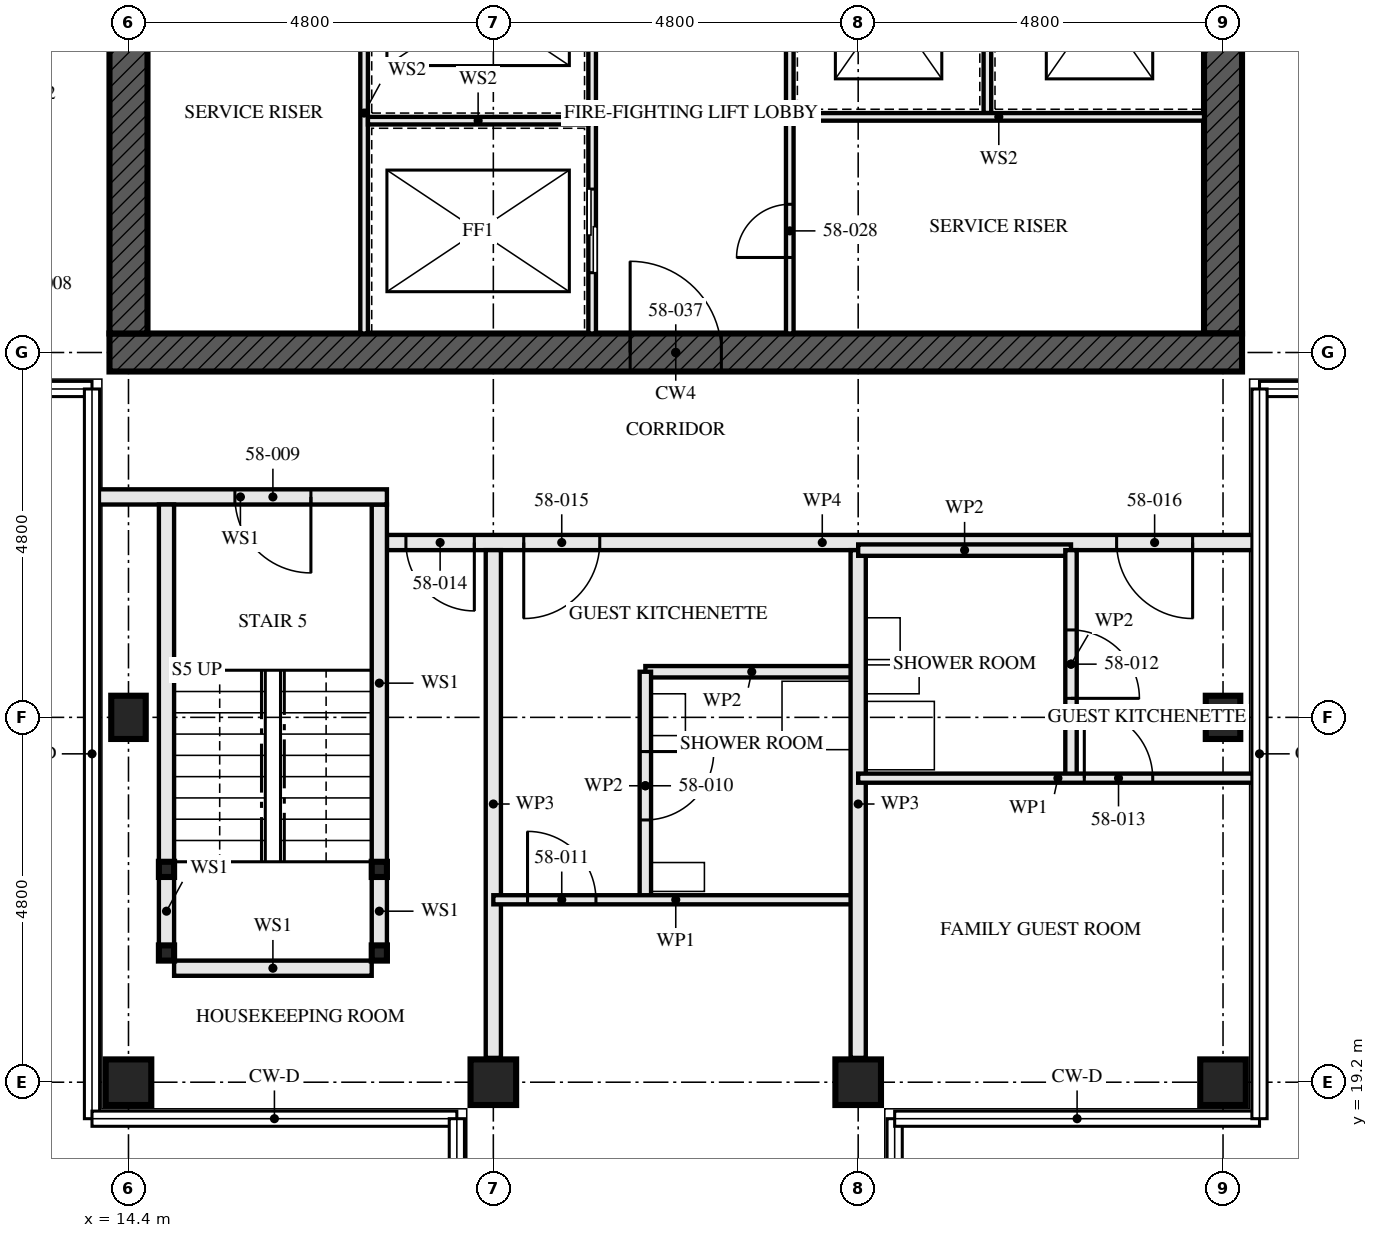
"""IFC4 building model, lengths in metres.
Left out: names, types, materials, properties, quantities, classifications, styles, units other than length and angle.
Written with IfcOpenShell. Run it as: python <this file> out.ifc"""

import sys

from ifc_helpers import new_model, si_unit, direction, frame, frame_2d, origin, origin_2d, place, context, subcontext, project, spatial, rectangle, hollow_rectangle, i_section, extrude, element, fill, save


model = new_model("IFC4")
c1 = context("Model", 3, precision=1e-05, world=origin(), true_north=direction((0.0, 1.0)))
c2 = subcontext(c1, "Body", "Model", "MODEL_VIEW")
j1 = project(units=[si_unit("LENGTHUNIT", "METRE"), si_unit("PLANEANGLEUNIT", "RADIAN")], contexts=[c1])
p1 = place(None, origin())
s1 = spatial("IfcSite", under=j1, at=p1, CompositionType="ELEMENT")
p2 = place(p1, origin())
s2 = spatial("IfcBuilding", under=s1, at=p2, CompositionType="ELEMENT")
p3 = place(p2, frame((0.0, 0.0, 212.0)))
s3 = spatial("IfcBuildingStorey", under=s2, at=p3, CompositionType="ELEMENT", Elevation=212.0)
p4 = place(p3, frame((14.4, 19.2, 0.0), z_axis=(0.0, 0.0, 1.0), x_axis=(0.0, 1.0, 0.0)))
e1 = element("IfcColumn", 1, at=p4, inside=s3, PredefinedType="COLUMN", context=c2, shape_type="SweptSolid", body=[
    extrude(hollow_rectangle(XDim=0.6, YDim=0.6, WallThickness=0.05, at=origin_2d()), origin(), (0.0, 0.0, 1.0), 3.5),
])
p5 = place(p3, frame((14.4, 24.0, 0.0), z_axis=(0.0, 0.0, 1.0), x_axis=(1.0, 0.0, 0.0)))
e2 = element("IfcColumn", 2, at=p5, inside=s3, PredefinedType="COLUMN", context=c2, shape_type="SweptSolid", body=[
    extrude(i_section(OverallWidth=0.454, OverallDepth=0.569, WebThickness=0.078, FlangeThickness=0.125, FilletRadius=0.015, at=origin_2d()), origin(), (0.0, 0.0, 1.0), 3.5),
])
for number, where, z_axis, x_axis in (
    (3, (19.2, 19.2, 0.0), (0.0, 0.0, 1.0), (0.0, 1.0, 0.0)),
    (4, (24.0, 19.2, 0.0), (0.0, 0.0, 1.0), (0.0, 1.0, 0.0)),
    (5, (28.8, 19.2, 0.0), (0.0, 0.0, 1.0), (0.0, 1.0, 0.0)),
):
    element("IfcColumn", number, at=place(p3, frame(where, z_axis=z_axis, x_axis=x_axis)), inside=s3, PredefinedType="COLUMN", context=c2, shape_type="SweptSolid", body=[
        extrude(hollow_rectangle(XDim=0.6, YDim=0.6, WallThickness=0.05, at=origin_2d()), origin(), (0.0, 0.0, 1.0), 3.5),
    ])
p6 = place(p3, frame((28.8, 24.0, 0.0), z_axis=(0.0, 0.0, 1.0), x_axis=(1.0, 0.0, 0.0)))
e6 = element("IfcColumn", 6, at=p6, inside=s3, PredefinedType="COLUMN", context=c2, shape_type="SweptSolid", body=[
    extrude(i_section(OverallWidth=0.454, OverallDepth=0.569, WebThickness=0.078, FlangeThickness=0.125, FilletRadius=0.015, at=origin_2d()), origin(), (0.0, 0.0, 1.0), 3.5),
])
p7 = place(p3, frame((14.15, 28.8, -0.17), z_axis=(0.0, 0.0, 1.0), x_axis=(1.0, 0.0, 0.0)))
e7 = element("IfcWall", 7, at=p7, inside=s3, PredefinedType="SHEAR", context=c2, shape_type="SweptSolid", body=[
    extrude(rectangle(XDim=14.9, YDim=0.5, at=frame_2d((7.45, 0.0))), origin(), (0.0, 0.0, 1.0), 3.5),
])
p8 = place(p7, frame((6.85, 0.0, 0.17)))
e8 = element("IfcOpeningElement", 8, at=p8, cuts=e7, PredefinedType="OPENING", context=c2, shape_type="SweptSolid", body=[
    extrude(rectangle(XDim=1.2, YDim=2.1, at=frame_2d((0.6, 1.05))), frame((0.0, 0.26, 0.0), z_axis=(0.0, -1.0, 0.0), x_axis=(1.0, 0.0, 0.0)), (0.0, 0.0, 1.0), 0.521),
])
p9 = place(p3, frame((14.4, 42.95, -0.17), z_axis=(0.0, 0.0, 1.0), x_axis=(0.0, -1.0, 0.0)))
e9 = element("IfcWall", 9, at=p9, inside=s3, PredefinedType="SHEAR", context=c2, shape_type="SweptSolid", body=[
    extrude(rectangle(XDim=13.9, YDim=0.5, at=frame_2d((6.95, 0.0))), origin(), (0.0, 0.0, 1.0), 3.5),
])
p10 = place(p9, frame((6.35, 0.0, 0.17)))
e10 = element("IfcOpeningElement", 10, at=p10, cuts=e9, PredefinedType="OPENING", context=c2, shape_type="SweptSolid", body=[
    extrude(rectangle(XDim=1.2, YDim=2.1, at=frame_2d((0.6, 1.05))), frame((0.0, 0.26, 0.0), z_axis=(0.0, -1.0, 0.0), x_axis=(1.0, 0.0, 0.0)), (0.0, 0.0, 1.0), 0.521),
])
p11 = place(p3, frame((28.8, 29.05, -0.17), z_axis=(0.0, 0.0, 1.0), x_axis=(0.0, 1.0, 0.0)))
e11 = element("IfcWall", 11, at=p11, inside=s3, PredefinedType="SHEAR", context=c2, shape_type="SweptSolid", body=[
    extrude(rectangle(XDim=13.9, YDim=0.5, at=frame_2d((6.95, 0.0))), origin(), (0.0, 0.0, 1.0), 3.5),
])
p12 = place(p11, frame((6.35, 0.0, 0.17)))
e12 = element("IfcOpeningElement", 12, at=p12, cuts=e11, PredefinedType="OPENING", context=c2, shape_type="SweptSolid", body=[
    extrude(rectangle(XDim=1.2, YDim=2.1, at=frame_2d((0.6, 1.05))), frame((0.0, 0.26, 0.0), z_axis=(0.0, -1.0, 0.0), x_axis=(1.0, 0.0, 0.0)), (0.0, 0.0, 1.0), 0.521),
])
for number, where, z_axis, x_axis in (
    (13, (14.9, 20.9, 0.0), (0.0, 0.0, 1.0), (1.0, 0.0, 0.0)),
    (14, (17.7, 20.9, 0.0), (0.0, 0.0, 1.0), (1.0, 0.0, 0.0)),
    (15, (14.9, 22.0, 0.0), (0.0, 0.0, 1.0), (1.0, 0.0, 0.0)),
    (16, (17.7, 22.0, 0.0), (0.0, 0.0, 1.0), (1.0, 0.0, 0.0)),
):
    element("IfcColumn", number, at=place(p3, frame(where, z_axis=z_axis, x_axis=x_axis)), inside=s3, PredefinedType="COLUMN", context=c2, shape_type="SweptSolid", body=[
        extrude(hollow_rectangle(XDim=0.2, YDim=0.2, WallThickness=0.008, at=origin_2d()), origin(), (0.0, 0.0, 1.0), 3.33),
    ])
p13 = place(p3, frame((14.9, 21.0, 0.0), z_axis=(0.0, 0.0, 1.0), x_axis=(0.0, 1.0, 0.0)))
e17 = element("IfcWall", 17, at=p13, inside=s3, PredefinedType="SOLIDWALL", context=c2, shape_type="SweptSolid", body=[
    extrude(rectangle(XDim=0.9, YDim=0.2, at=frame_2d((0.45, 0.0))), origin(), (0.0, 0.0, 1.0), 2.99),
])
p14 = place(p3, frame((14.9, 22.1, 0.0), z_axis=(0.0, 0.0, 1.0), x_axis=(0.0, 1.0, 0.0)))
e18 = element("IfcWall", 18, at=p14, inside=s3, PredefinedType="SOLIDWALL", context=c2, shape_type="SweptSolid", body=[
    extrude(rectangle(XDim=4.7, YDim=0.2, at=frame_2d((2.35, 0.0))), origin(), (0.0, 0.0, 1.0), 2.99),
])
p15 = place(p3, frame((17.7, 21.0, 0.0), z_axis=(0.0, 0.0, 1.0), x_axis=(0.0, 1.0, 0.0)))
e19 = element("IfcWall", 19, at=p15, inside=s3, PredefinedType="SOLIDWALL", context=c2, shape_type="SweptSolid", body=[
    extrude(rectangle(XDim=0.9, YDim=0.2, at=frame_2d((0.45, 0.0))), origin(), (0.0, 0.0, 1.0), 2.99),
])
p16 = place(p3, frame((17.7, 22.1, 0.0), z_axis=(0.0, 0.0, 1.0), x_axis=(0.0, 1.0, 0.0)))
e20 = element("IfcWall", 20, at=p16, inside=s3, PredefinedType="SOLIDWALL", context=c2, shape_type="SweptSolid", body=[
    extrude(rectangle(XDim=4.7, YDim=0.2, at=frame_2d((2.35, 0.0))), origin(), (0.0, 0.0, 1.0), 2.99),
])
p17 = place(p3, frame((15.0, 20.7, 0.0), z_axis=(0.0, 0.0, 1.0), x_axis=(1.0, 0.0, 0.0)))
e21 = element("IfcWall", 21, at=p17, inside=s3, PredefinedType="SOLIDWALL", context=c2, shape_type="SweptSolid", body=[
    extrude(rectangle(XDim=2.6, YDim=0.2, at=frame_2d((1.3, 0.0))), origin(), (0.0, 0.0, 1.0), 3.33),
])
p18 = place(p3, frame((13.945, 26.9, 0.0), z_axis=(0.0, 0.0, 1.0), x_axis=(1.0, 0.0, 0.0)))
e22 = element("IfcWall", 22, at=p18, inside=s3, PredefinedType="SOLIDWALL", context=c2, shape_type="SweptSolid", body=[
    extrude(rectangle(XDim=3.855, YDim=0.2, at=frame_2d((1.927, 0.0))), origin(), (0.0, 0.0, 1.0), 2.32),
])
p19 = place(p18, frame((1.855, 0.0, 0.0)))
e23 = element("IfcOpeningElement", 23, at=p19, cuts=e22, PredefinedType="OPENING", context=c2, shape_type="SweptSolid", body=[
    extrude(rectangle(XDim=1.0, YDim=2.1, at=frame_2d((0.5, 1.05))), frame((0.0, 0.111, 0.0), z_axis=(0.0, -1.0, 0.0), x_axis=(1.0, 0.0, 0.0)), (0.0, 0.0, 1.0), 0.221),
])
p20 = place(p3, frame((19.2, 19.52, 0.0), z_axis=(0.0, 0.0, 1.0), x_axis=(0.0, 1.0, 0.0)))
e24 = element("IfcWall", 24, at=p20, inside=s3, PredefinedType="PARTITIONING", context=c2, shape_type="SweptSolid", body=[
    extrude(rectangle(XDim=6.68, YDim=0.2, at=frame_2d((3.34, 0.0))), origin(), (0.0, 0.0, 1.0), 2.55),
])
p21 = place(p3, frame((21.2, 21.6, 0.0), z_axis=(0.0, 0.0, 1.0), x_axis=(0.0, 1.0, 0.0)))
e25 = element("IfcWall", 25, at=p21, inside=s3, PredefinedType="PARTITIONING", context=c2, shape_type="SweptSolid", body=[
    extrude(rectangle(XDim=3.0, YDim=0.15, at=frame_2d((1.5, 0.0))), origin(), (0.0, 0.0, 1.0), 2.55),
])
p22 = place(p21, frame((1.05, 0.0, 0.0)))
e26 = element("IfcOpeningElement", 26, at=p22, cuts=e25, PredefinedType="OPENING", context=c2, shape_type="SweptSolid", body=[
    extrude(rectangle(XDim=0.9, YDim=2.1, at=frame_2d((0.45, 1.05))), frame((0.0, 0.085, 0.0), z_axis=(0.0, -1.0, 0.0), x_axis=(1.0, 0.0, 0.0)), (0.0, 0.0, 1.0), 0.171),
])
p23 = place(p3, frame((21.2, 24.6, 0.0), z_axis=(0.0, 0.0, 1.0), x_axis=(1.0, 0.0, 0.0)))
e27 = element("IfcWall", 27, at=p23, inside=s3, PredefinedType="PARTITIONING", context=c2, shape_type="SweptSolid", body=[
    extrude(rectangle(XDim=2.8, YDim=0.15, at=frame_2d((1.4, 0.0))), origin(), (0.0, 0.0, 1.0), 3.33),
])
p24 = place(p3, frame((19.2, 21.6, 0.0), z_axis=(0.0, 0.0, 1.0), x_axis=(1.0, 0.0, 0.0)))
e28 = element("IfcWall", 28, at=p24, inside=s3, PredefinedType="PARTITIONING", context=c2, shape_type="SweptSolid", body=[
    extrude(rectangle(XDim=4.8, YDim=0.12, at=frame_2d((2.4, 0.0))), origin(), (0.0, 0.0, 1.0), 3.33),
])
p25 = place(p24, frame((0.45, 0.0, 0.0)))
e29 = element("IfcOpeningElement", 29, at=p25, cuts=e28, PredefinedType="OPENING", context=c2, shape_type="SweptSolid", body=[
    extrude(rectangle(XDim=0.9, YDim=2.1, at=frame_2d((0.45, 1.05))), frame((0.0, 0.071, 0.0), z_axis=(0.0, -1.0, 0.0), x_axis=(1.0, 0.0, 0.0)), (0.0, 0.0, 1.0), 0.141),
])
p26 = place(p3, frame((24.0, 19.52, 0.0), z_axis=(0.0, 0.0, 1.0), x_axis=(0.0, 1.0, 0.0)))
e30 = element("IfcWall", 30, at=p26, inside=s3, PredefinedType="PARTITIONING", context=c2, shape_type="SweptSolid", body=[
    extrude(rectangle(XDim=6.68, YDim=0.2, at=frame_2d((3.34, 0.0))), origin(), (0.0, 0.0, 1.0), 2.55),
])
p27 = place(p3, frame((26.8, 23.2, 0.0), z_axis=(0.0, 0.0, 1.0), x_axis=(0.0, 1.0, 0.0)))
e31 = element("IfcWall", 31, at=p27, inside=s3, PredefinedType="PARTITIONING", context=c2, shape_type="SweptSolid", body=[
    extrude(rectangle(XDim=3.0, YDim=0.15, at=frame_2d((1.5, 0.0))), origin(), (0.0, 0.0, 1.0), 2.55),
])
p28 = place(p27, frame((1.05, 0.0, 0.0)))
e32 = element("IfcOpeningElement", 32, at=p28, cuts=e31, PredefinedType="OPENING", context=c2, shape_type="SweptSolid", body=[
    extrude(rectangle(XDim=0.9, YDim=2.1, at=frame_2d((0.45, 1.05))), frame((0.0, 0.085, 0.0), z_axis=(0.0, -1.0, 0.0), x_axis=(1.0, 0.0, 0.0)), (0.0, 0.0, 1.0), 0.171),
])
p29 = place(p3, frame((24.0, 26.2, 0.0), z_axis=(0.0, 0.0, 1.0), x_axis=(1.0, 0.0, 0.0)))
e33 = element("IfcWall", 33, at=p29, inside=s3, PredefinedType="PARTITIONING", context=c2, shape_type="SweptSolid", body=[
    extrude(rectangle(XDim=2.8, YDim=0.15, at=frame_2d((1.4, 0.0))), origin(), (0.0, 0.0, 1.0), 3.33),
])
p30 = place(p3, frame((24.0, 23.2, 0.0), z_axis=(0.0, 0.0, 1.0), x_axis=(1.0, 0.0, 0.0)))
e34 = element("IfcWall", 34, at=p30, inside=s3, PredefinedType="PARTITIONING", context=c2, shape_type="SweptSolid", body=[
    extrude(rectangle(XDim=5.255, YDim=0.12, at=frame_2d((2.627, 0.0))), origin(), (0.0, 0.0, 1.0), 2.32),
])
p31 = place(p30, frame((2.975, 0.0, 0.0)))
e35 = element("IfcOpeningElement", 35, at=p31, cuts=e34, PredefinedType="OPENING", context=c2, shape_type="SweptSolid", body=[
    extrude(rectangle(XDim=0.9, YDim=2.1, at=frame_2d((0.45, 1.05))), frame((0.0, 0.071, 0.0), z_axis=(0.0, -1.0, 0.0), x_axis=(1.0, 0.0, 0.0)), (0.0, 0.0, 1.0), 0.141),
])
p32 = place(p3, frame((17.8, 26.3, 0.0), z_axis=(0.0, 0.0, 1.0), x_axis=(1.0, 0.0, 0.0)))
e36 = element("IfcWall", 36, at=p32, inside=s3, PredefinedType="PARTITIONING", context=c2, shape_type="SweptSolid", body=[
    extrude(rectangle(XDim=11.455, YDim=0.2, at=frame_2d((5.728, 0.0))), origin(), (0.0, 0.0, 1.0), 2.32),
])
p33 = place(p32, frame((0.25, 0.0, 0.0)))
e37 = element("IfcOpeningElement", 37, at=p33, cuts=e36, PredefinedType="OPENING", context=c2, shape_type="SweptSolid", body=[
    extrude(rectangle(XDim=0.9, YDim=2.1, at=frame_2d((0.45, 1.05))), frame((0.0, 0.111, 0.0), z_axis=(0.0, -1.0, 0.0), x_axis=(1.0, 0.0, 0.0)), (0.0, 0.0, 1.0), 0.221),
])
p34 = place(p32, frame((1.8, 0.0, 0.0)))
e38 = element("IfcOpeningElement", 38, at=p34, cuts=e36, PredefinedType="OPENING", context=c2, shape_type="SweptSolid", body=[
    extrude(rectangle(XDim=1.0, YDim=2.1, at=frame_2d((0.5, 1.05))), frame((0.0, 0.111, 0.0), z_axis=(0.0, -1.0, 0.0), x_axis=(1.0, 0.0, 0.0)), (0.0, 0.0, 1.0), 0.221),
])
p35 = place(p32, frame((9.6, 0.0, 0.0)))
e39 = element("IfcOpeningElement", 39, at=p35, cuts=e36, PredefinedType="OPENING", context=c2, shape_type="SweptSolid", body=[
    extrude(rectangle(XDim=1.0, YDim=2.1, at=frame_2d((0.5, 1.05))), frame((0.0, 0.111, 0.0), z_axis=(0.0, -1.0, 0.0), x_axis=(1.0, 0.0, 0.0)), (0.0, 0.0, 1.0), 0.221),
])
p36 = place(p3, frame((20.5, 29.05, 0.0), z_axis=(0.0, 0.0, 1.0), x_axis=(0.0, 1.0, 0.0)))
e40 = element("IfcWall", 40, at=p36, inside=s3, PredefinedType="SOLIDWALL", context=c2, shape_type="SweptSolid", body=[
    extrude(rectangle(XDim=5.8, YDim=0.1, at=frame_2d((2.9, 0.0))), origin(), (0.0, 0.0, 1.0), 3.33),
])
p37 = place(p36, frame((0.8, 0.0, 0.0)))
e41 = element("IfcOpeningElement", 41, at=p37, cuts=e40, PredefinedType="OPENING", context=c2, shape_type="SweptSolid", body=[
    extrude(rectangle(XDim=1.1, YDim=2.3, at=frame_2d((0.55, 1.15))), frame((0.0, 0.061, 0.0), z_axis=(0.0, -1.0, 0.0), x_axis=(1.0, 0.0, 0.0)), (0.0, 0.0, 1.0), 0.121),
])
p38 = place(p36, frame((3.775, 0.0, 0.0)))
e42 = element("IfcOpeningElement", 42, at=p38, cuts=e40, PredefinedType="OPENING", context=c2, shape_type="SweptSolid", body=[
    extrude(rectangle(XDim=1.1, YDim=2.3, at=frame_2d((0.55, 1.15))), frame((0.0, 0.061, 0.0), z_axis=(0.0, -1.0, 0.0), x_axis=(1.0, 0.0, 0.0)), (0.0, 0.0, 1.0), 0.121),
])
p39 = place(p3, frame((23.1, 29.05, 0.0), z_axis=(0.0, 0.0, 1.0), x_axis=(0.0, 1.0, 0.0)))
e43 = element("IfcWall", 43, at=p39, inside=s3, PredefinedType="SOLIDWALL", context=c2, shape_type="SweptSolid", body=[
    extrude(rectangle(XDim=5.8, YDim=0.1, at=frame_2d((2.9, 0.0))), origin(), (0.0, 0.0, 1.0), 3.33),
])
p40 = place(p39, frame((1.0, 0.0, 0.0)))
e44 = element("IfcOpeningElement", 44, at=p40, cuts=e43, PredefinedType="OPENING", context=c2, shape_type="SweptSolid", body=[
    extrude(rectangle(XDim=0.7, YDim=2.1, at=frame_2d((0.35, 1.05))), frame((0.0, 0.061, 0.0), z_axis=(0.0, -1.0, 0.0), x_axis=(1.0, 0.0, 0.0)), (0.0, 0.0, 1.0), 0.121),
])
p41 = place(p3, frame((17.5, 29.05, 0.0), z_axis=(0.0, 0.0, 1.0), x_axis=(0.0, 1.0, 0.0)))
e45 = element("IfcWall", 45, at=p41, inside=s3, PredefinedType="SOLIDWALL", context=c2, shape_type="SweptSolid", body=[
    extrude(rectangle(XDim=5.8, YDim=0.1, at=frame_2d((2.9, 0.0))), origin(), (0.0, 0.0, 1.0), 3.33),
])
p42 = place(p3, frame((17.55, 31.85, 0.0), z_axis=(0.0, 0.0, 1.0), x_axis=(1.0, 0.0, 0.0)))
e46 = element("IfcWall", 46, at=p42, inside=s3, PredefinedType="SOLIDWALL", context=c2, shape_type="SweptSolid", body=[
    extrude(rectangle(XDim=2.9, YDim=0.1, at=frame_2d((1.45, 0.0))), origin(), (0.0, 0.0, 1.0), 3.33),
])
p43 = place(p3, frame((25.7, 31.95, 0.0), z_axis=(0.0, 0.0, 1.0), x_axis=(0.0, 1.0, 0.0)))
e47 = element("IfcWall", 47, at=p43, inside=s3, PredefinedType="SOLIDWALL", context=c2, shape_type="SweptSolid", body=[
    extrude(rectangle(XDim=2.9, YDim=0.1, at=frame_2d((1.45, 0.0))), origin(), (0.0, 0.0, 1.0), 3.33),
])
p44 = place(p3, frame((23.15, 31.9, 0.0), z_axis=(0.0, 0.0, 1.0), x_axis=(1.0, 0.0, 0.0)))
e48 = element("IfcWall", 48, at=p44, inside=s3, PredefinedType="SOLIDWALL", context=c2, shape_type="SweptSolid", body=[
    extrude(rectangle(XDim=5.4, YDim=0.1, at=frame_2d((2.7, 0.0))), origin(), (0.0, 0.0, 1.0), 3.33),
])
p45 = place(p19, frame((1.0, 0.0, 0.0), z_axis=(0.0, 0.0, 1.0), x_axis=(-1.0, 0.0, 0.0)))
e49 = element("IfcDoor", 49, at=p45, inside=s3, OperationType="SINGLE_SWING_RIGHT", PredefinedType="DOOR", context=c2, shape_type="SweptSolid", body=[
    extrude(rectangle(XDim=1.0, YDim=2.1, at=frame_2d((0.5, 1.05))), frame((0.0, 0.032, 0.0), z_axis=(0.0, -1.0, 0.0), x_axis=(1.0, 0.0, 0.0)), (0.0, 0.0, 1.0), 0.064),
])
fill(e23, e49)
p46 = place(p22, frame((0.9, 0.0, 0.0), z_axis=(0.0, 0.0, 1.0), x_axis=(-1.0, 0.0, 0.0)))
e50 = element("IfcDoor", 50, at=p46, inside=s3, OperationType="SINGLE_SWING_RIGHT", PredefinedType="DOOR", context=c2, shape_type="SweptSolid", body=[
    extrude(rectangle(XDim=0.9, YDim=2.1, at=frame_2d((0.45, 1.05))), frame((0.0, 0.022, 0.0), z_axis=(0.0, -1.0, 0.0), x_axis=(1.0, 0.0, 0.0)), (0.0, 0.0, 1.0), 0.044),
])
fill(e26, e50)
p47 = place(p25, origin())
e51 = element("IfcDoor", 51, at=p47, inside=s3, OperationType="SINGLE_SWING_RIGHT", PredefinedType="DOOR", context=c2, shape_type="SweptSolid", body=[
    extrude(rectangle(XDim=0.9, YDim=2.1, at=frame_2d((0.45, 1.05))), frame((0.0, 0.022, 0.0), z_axis=(0.0, -1.0, 0.0), x_axis=(1.0, 0.0, 0.0)), (0.0, 0.0, 1.0), 0.044),
])
fill(e29, e51)
p48 = place(p28, frame((0.9, 0.0, 0.0), z_axis=(0.0, 0.0, 1.0), x_axis=(-1.0, 0.0, 0.0)))
e52 = element("IfcDoor", 52, at=p48, inside=s3, OperationType="SINGLE_SWING_LEFT", PredefinedType="DOOR", context=c2, shape_type="SweptSolid", body=[
    extrude(rectangle(XDim=0.9, YDim=2.1, at=frame_2d((0.45, 1.05))), frame((0.0, 0.022, 0.0), z_axis=(0.0, -1.0, 0.0), x_axis=(1.0, 0.0, 0.0)), (0.0, 0.0, 1.0), 0.044),
])
fill(e32, e52)
p49 = place(p31, origin())
e53 = element("IfcDoor", 53, at=p49, inside=s3, OperationType="SINGLE_SWING_RIGHT", PredefinedType="DOOR", context=c2, shape_type="SweptSolid", body=[
    extrude(rectangle(XDim=0.9, YDim=2.1, at=frame_2d((0.45, 1.05))), frame((0.0, 0.022, 0.0), z_axis=(0.0, -1.0, 0.0), x_axis=(1.0, 0.0, 0.0)), (0.0, 0.0, 1.0), 0.044),
])
fill(e35, e53)
p50 = place(p33, frame((0.9, 0.0, 0.0), z_axis=(0.0, 0.0, 1.0), x_axis=(-1.0, 0.0, 0.0)))
e54 = element("IfcDoor", 54, at=p50, inside=s3, OperationType="SINGLE_SWING_RIGHT", PredefinedType="DOOR", context=c2, shape_type="SweptSolid", body=[
    extrude(rectangle(XDim=0.9, YDim=2.1, at=frame_2d((0.45, 1.05))), frame((0.0, 0.027, 0.0), z_axis=(0.0, -1.0, 0.0), x_axis=(1.0, 0.0, 0.0)), (0.0, 0.0, 1.0), 0.054),
])
fill(e37, e54)
p51 = place(p34, frame((1.0, 0.0, 0.0), z_axis=(0.0, 0.0, 1.0), x_axis=(-1.0, 0.0, 0.0)))
e55 = element("IfcDoor", 55, at=p51, inside=s3, OperationType="SINGLE_SWING_LEFT", PredefinedType="DOOR", context=c2, shape_type="SweptSolid", body=[
    extrude(rectangle(XDim=1.0, YDim=2.1, at=frame_2d((0.5, 1.05))), frame((0.0, 0.027, 0.0), z_axis=(0.0, -1.0, 0.0), x_axis=(1.0, 0.0, 0.0)), (0.0, 0.0, 1.0), 0.054),
])
fill(e38, e55)
p52 = place(p35, frame((1.0, 0.0, 0.0), z_axis=(0.0, 0.0, 1.0), x_axis=(-1.0, 0.0, 0.0)))
e56 = element("IfcDoor", 56, at=p52, inside=s3, OperationType="SINGLE_SWING_RIGHT", PredefinedType="DOOR", context=c2, shape_type="SweptSolid", body=[
    extrude(rectangle(XDim=1.0, YDim=2.1, at=frame_2d((0.5, 1.05))), frame((0.0, 0.027, 0.0), z_axis=(0.0, -1.0, 0.0), x_axis=(1.0, 0.0, 0.0)), (0.0, 0.0, 1.0), 0.054),
])
fill(e39, e56)
p53 = place(p37, origin())
e57 = element("IfcDoor", 57, at=p53, inside=s3, OperationType="SLIDING_TO_LEFT", PredefinedType="DOOR", context=c2, shape_type="SweptSolid", body=[
    extrude(rectangle(XDim=1.1, YDim=2.3, at=frame_2d((0.55, 1.15))), frame((0.0, 0.05, 0.0), z_axis=(0.0, -1.0, 0.0), x_axis=(1.0, 0.0, 0.0)), (0.0, 0.0, 1.0), 0.1),
])
fill(e41, e57)
p54 = place(p40, origin())
e58 = element("IfcDoor", 58, at=p54, inside=s3, OperationType="SINGLE_SWING_RIGHT", PredefinedType="DOOR", context=c2, shape_type="SweptSolid", body=[
    extrude(rectangle(XDim=0.7, YDim=2.1, at=frame_2d((0.35, 1.05))), frame((0.0, 0.027, 0.0), z_axis=(0.0, -1.0, 0.0), x_axis=(1.0, 0.0, 0.0)), (0.0, 0.0, 1.0), 0.054),
])
fill(e44, e58)
p55 = place(p8, origin())
e59 = element("IfcDoor", 59, at=p55, inside=s3, OperationType="SINGLE_SWING_LEFT", PredefinedType="DOOR", context=c2, shape_type="SweptSolid", body=[
    extrude(rectangle(XDim=1.2, YDim=2.1, at=frame_2d((0.6, 1.05))), frame((0.0, 0.027, 0.0), z_axis=(0.0, -1.0, 0.0), x_axis=(1.0, 0.0, 0.0)), (0.0, 0.0, 1.0), 0.054),
])
fill(e8, e59)
save(model, sys.argv[1])
